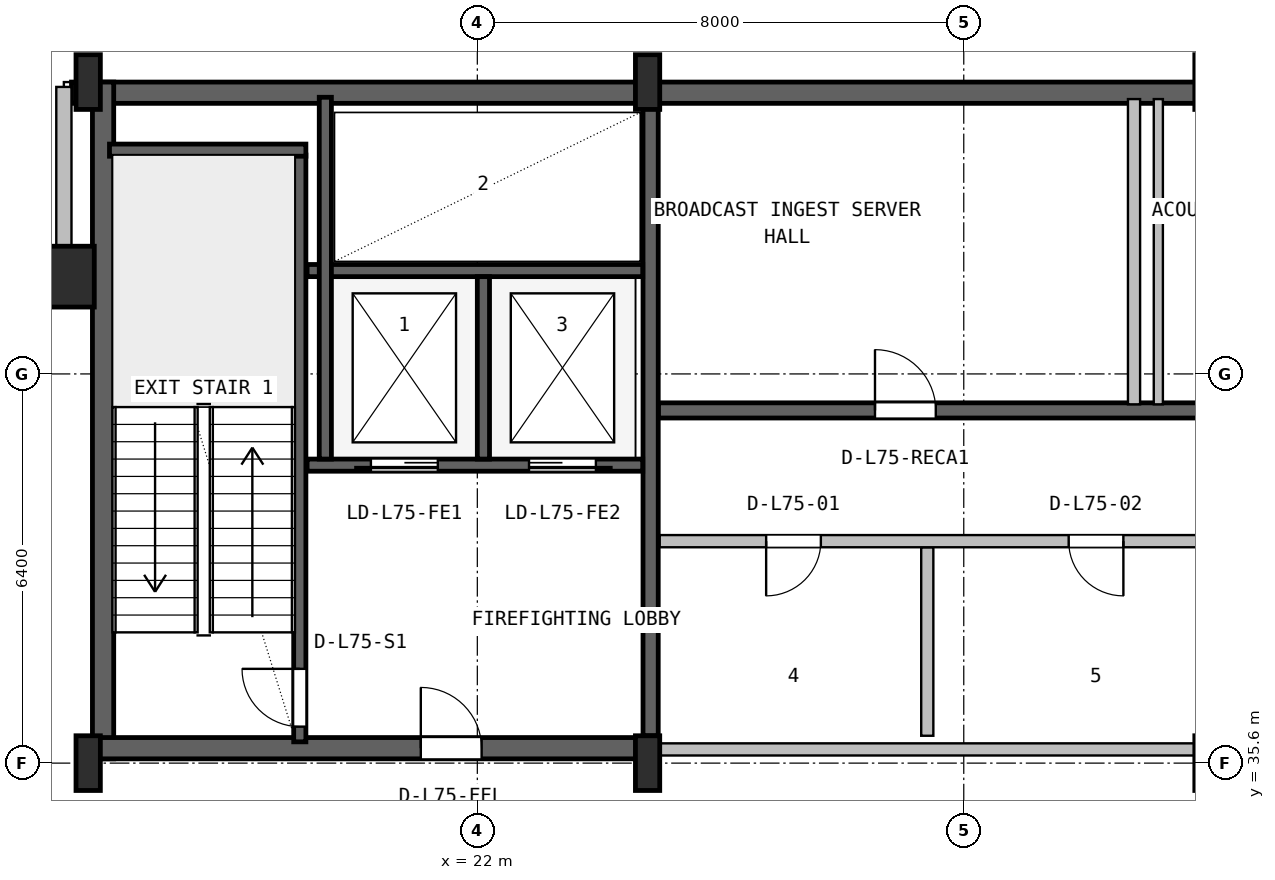
"""IFC4 building model, lengths in metres.
Left out: names, types, materials, properties, quantities, classifications, styles, units other than length and angle.
Written with IfcOpenShell. Run it as: python <this file> out.ifc"""

import sys

from ifc_helpers import new_model, si_unit, direction, frame, frame_2d, origin, origin_2d, place, context, subcontext, project, spatial, rectangle, hollow_rectangle, i_section, extrude, source, transform, mapped, element, fill, save


model = new_model("IFC4")
c1 = context("Model", 3, precision=1e-05, world=origin(), true_north=direction((0.0, 1.0)))
c2 = subcontext(c1, "Body", "Model", "MODEL_VIEW")
j1 = project(units=[si_unit("LENGTHUNIT", "METRE"), si_unit("PLANEANGLEUNIT", "RADIAN")], contexts=[c1])
p1 = place(None, origin())
s1 = spatial("IfcSite", under=j1, at=p1, CompositionType="ELEMENT")
p2 = place(p1, origin())
s2 = spatial("IfcBuilding", under=s1, at=p2, CompositionType="ELEMENT")
p3 = place(p2, frame((0.0, 0.0, 300.2)))
s3 = spatial("IfcBuildingStorey", under=s2, at=p3, CompositionType="ELEMENT", Elevation=300.2)
p4 = place(p3, frame((15.325, 46.625, 0.0), z_axis=(0.0, 0.0, 1.0), x_axis=(1.0, 0.0, 0.0)))
e1 = element("IfcWall", 1, at=p4, inside=s3, PredefinedType="SHEAR", context=c2, shape_type="SweptSolid", body=[
    extrude(rectangle(XDim=37.35, YDim=0.35, at=frame_2d((18.675, 0.0))), origin(), (0.0, 0.0, 1.0), 4.52),
])
p5 = place(p3, frame((15.845, 35.67, 0.0), z_axis=(0.0, 0.0, 1.0), x_axis=(0.0, 1.0, 0.0)))
e2 = element("IfcWall", 2, at=p5, inside=s3, PredefinedType="SHEAR", context=c2, shape_type="SweptSolid", body=[
    extrude(rectangle(XDim=11.13, YDim=0.35, at=frame_2d((5.565, 0.0))), origin(), (0.0, 0.0, 1.0), 4.52),
])
p6 = place(p3, frame((15.67, 35.845, 0.0), z_axis=(0.0, 0.0, 1.0), x_axis=(1.0, 0.0, 0.0)))
e3 = element("IfcWall", 3, at=p6, inside=s3, PredefinedType="SHEAR", context=c2, shape_type="SweptSolid", body=[
    extrude(rectangle(XDim=9.13, YDim=0.35, at=frame_2d((4.565, 0.0))), origin(), (0.0, 0.0, 1.0), 4.52),
])
p7 = place(p6, frame((5.4, 0.0, 0.0)))
e4 = element("IfcOpeningElement", 4, at=p7, cuts=e3, PredefinedType="OPENING", context=c2, shape_type="SweptSolid", body=[
    extrude(rectangle(XDim=1.0, YDim=2.1, at=frame_2d((0.5, 1.05))), frame((0.0, 0.185, 0.0), z_axis=(0.0, -1.0, 0.0), x_axis=(1.0, 0.0, 0.0)), (0.0, 0.0, 1.0), 0.37),
])
m1 = source(origin(), c2, "Body", "SweptSolid", [
    extrude(i_section(OverallWidth=0.4, OverallDepth=0.9, WebThickness=0.016, FlangeThickness=0.028, FilletRadius=0.016, at=origin_2d()), origin(), (0.0, 0.0, 1.0), 4.8),
])
for number, where, z_axis, x_axis in (
    (5, (15.6, 35.6, 0.0), (0.0, 0.0, 1.0), (1.0, 0.0, 0.0)),
    (6, (15.6, 46.8, 0.0), (0.0, 0.0, 1.0), (1.0, 0.0, 0.0)),
    (7, (24.8, 35.6, 0.0), (0.0, 0.0, 1.0), (1.0, 0.0, 0.0)),
    (8, (24.8, 46.8, 0.0), (0.0, 0.0, 1.0), (1.0, 0.0, 0.0)),
):
    element("IfcColumn", number, at=place(p3, frame(where, z_axis=z_axis, x_axis=x_axis)), inside=s3, PredefinedType="COLUMN", context=c2, shape_type="MappedRepresentation", body=[
        mapped(m1, transform((0.0, 0.0, 0.0), x_axis=(1.0, 0.0, 0.0), y_axis=(0.0, 1.0, 0.0), z_axis=(0.0, 0.0, 1.0), scale=1.0)),
    ])
m2 = source(origin(), c2, "Body", "SweptSolid", [
    extrude(hollow_rectangle(XDim=1.0, YDim=1.0, WallThickness=0.04, at=origin_2d()), origin(), (0.0, 0.0, 1.0), 4.8),
])
p8 = place(p3, frame((15.2, 43.6, 0.0), z_axis=(0.0, 0.0, 1.0), x_axis=(1.0, 0.0, 0.0)))
e9 = element("IfcColumn", 9, at=p8, inside=s3, PredefinedType="COLUMN", context=c2, shape_type="MappedRepresentation", body=[
    mapped(m2, transform((0.0, 0.0, 0.0), x_axis=(1.0, 0.0, 0.0), y_axis=(0.0, 1.0, 0.0), z_axis=(0.0, 0.0, 1.0), scale=1.0)),
])
p9 = place(p3, frame((12.08, 43.6, 0.0), z_axis=(0.0, 0.0, 1.0), x_axis=(1.0, 0.0, 0.0)))
e10 = element("IfcWall", 10, at=p9, inside=s3, PredefinedType="SOLIDWALL", context=c2, shape_type="SweptSolid", body=[
    extrude(rectangle(XDim=2.99, YDim=0.25, at=frame_2d((1.495, 0.0))), origin(), (0.0, 0.0, 1.0), 4.5),
])
p10 = place(p3, frame((15.2, 43.52, 0.0), z_axis=(0.0, 0.0, 1.0), x_axis=(0.0, 1.0, 0.0)))
e11 = element("IfcWall", 11, at=p10, inside=s3, PredefinedType="SOLIDWALL", context=c2, shape_type="SweptSolid", body=[
    extrude(rectangle(XDim=3.2, YDim=0.25, at=frame_2d((1.6, 0.0))), origin(), (0.0, 0.0, 1.0), 4.141),
])
p11 = place(p3, frame((19.08, 35.95, 0.0), z_axis=(0.0, 0.0, 1.0), x_axis=(0.0, 1.0, 0.0)))
e12 = element("IfcWall", 12, at=p11, inside=s3, PredefinedType="SHEAR", context=c2, shape_type="SweptSolid", body=[
    extrude(rectangle(XDim=9.65, YDim=0.2, at=frame_2d((4.825, 0.0))), origin(), (0.0, 0.0, 1.0), 4.52),
])
p12 = place(p11, frame((0.25, 0.0, 0.0)))
e13 = element("IfcOpeningElement", 13, at=p12, cuts=e12, PredefinedType="OPENING", context=c2, shape_type="SweptSolid", body=[
    extrude(rectangle(XDim=0.95, YDim=2.1, at=frame_2d((0.475, 1.05))), frame((0.0, 0.11, 0.0), z_axis=(0.0, -1.0, 0.0), x_axis=(1.0, 0.0, 0.0)), (0.0, 0.0, 1.0), 0.22),
])
p13 = place(p3, frame((15.95, 45.68, 0.0), z_axis=(0.0, 0.0, 1.0), x_axis=(1.0, 0.0, 0.0)))
e14 = element("IfcWall", 14, at=p13, inside=s3, PredefinedType="SHEAR", context=c2, shape_type="SweptSolid", body=[
    extrude(rectangle(XDim=3.23, YDim=0.2, at=frame_2d((1.615, 0.0))), origin(), (0.0, 0.0, 1.0), 4.52),
])
p14 = place(p3, frame((24.85, 36.05, 0.0), z_axis=(0.0, 0.0, 1.0), x_axis=(0.0, 1.0, 0.0)))
e15 = element("IfcWall", 15, at=p14, inside=s3, PredefinedType="SHEAR", context=c2, shape_type="SweptSolid", body=[
    extrude(rectangle(XDim=10.45, YDim=0.25, at=frame_2d((5.225, 0.0))), origin(), (0.0, 0.0, 1.0), 4.52),
])
p15 = place(p3, frame((19.2, 40.5, 0.0), z_axis=(0.0, 0.0, 1.0), x_axis=(1.0, 0.0, 0.0)))
e16 = element("IfcWall", 16, at=p15, inside=s3, PredefinedType="SHEAR", context=c2, shape_type="SweptSolid", body=[
    extrude(rectangle(XDim=5.52, YDim=0.2, at=frame_2d((2.76, 0.0))), origin(), (0.0, 0.0, 1.0), 4.52),
])
p16 = place(p15, frame((1.05, 0.0, 0.0)))
e17 = element("IfcOpeningElement", 17, at=p16, cuts=e16, PredefinedType="OPENING", context=c2, shape_type="SweptSolid", body=[
    extrude(rectangle(XDim=1.1, YDim=2.18, at=frame_2d((0.55, 1.09))), frame((0.0, 0.11, 0.0), z_axis=(0.0, -1.0, 0.0), x_axis=(1.0, 0.0, 0.0)), (0.0, 0.0, 1.0), 0.22),
])
p17 = place(p15, frame((3.65, 0.0, 0.0)))
e18 = element("IfcOpeningElement", 18, at=p17, cuts=e16, PredefinedType="OPENING", context=c2, shape_type="SweptSolid", body=[
    extrude(rectangle(XDim=1.1, YDim=2.18, at=frame_2d((0.55, 1.09))), frame((0.0, 0.11, 0.0), z_axis=(0.0, -1.0, 0.0), x_axis=(1.0, 0.0, 0.0)), (0.0, 0.0, 1.0), 0.22),
])
p18 = place(p3, frame((19.2, 43.7, 0.0), z_axis=(0.0, 0.0, 1.0), x_axis=(1.0, 0.0, 0.0)))
e19 = element("IfcWall", 19, at=p18, inside=s3, PredefinedType="SHEAR", context=c2, shape_type="SweptSolid", body=[
    extrude(rectangle(XDim=5.52, YDim=0.2, at=frame_2d((2.76, 0.0))), origin(), (0.0, 0.0, 1.0), 4.52),
])
p19 = place(p3, frame((22.1, 40.6, 0.0), z_axis=(0.0, 0.0, 1.0), x_axis=(0.0, 1.0, 0.0)))
e20 = element("IfcWall", 20, at=p19, inside=s3, PredefinedType="SHEAR", context=c2, shape_type="SweptSolid", body=[
    extrude(rectangle(XDim=3.0, YDim=0.2, at=frame_2d((1.5, 0.0))), origin(), (0.0, 0.0, 1.0), 4.52),
])
p20 = place(p3, frame((19.5, 40.6, 0.0), z_axis=(0.0, 0.0, 1.0), x_axis=(0.0, 1.0, 0.0)))
e21 = element("IfcWall", 21, at=p20, inside=s3, PredefinedType="SHEAR", context=c2, shape_type="SweptSolid", body=[
    extrude(rectangle(XDim=5.95, YDim=0.2, at=frame_2d((2.975, 0.0))), origin(), (0.0, 0.0, 1.0), 4.52),
])
p21 = place(p3, frame((24.98, 41.4, 0.0), z_axis=(0.0, 0.0, 1.0), x_axis=(1.0, 0.0, 0.0)))
e22 = element("IfcWall", 22, at=p21, inside=s3, PredefinedType="SHEAR", context=c2, shape_type="SweptSolid", body=[
    extrude(rectangle(XDim=23.82, YDim=0.25, at=frame_2d((11.91, 0.0))), origin(), (0.0, 0.0, 1.0), 4.52),
])
p22 = place(p21, frame((3.56, 0.0, 0.0)))
e23 = element("IfcOpeningElement", 23, at=p22, cuts=e22, PredefinedType="OPENING", context=c2, shape_type="SweptSolid", body=[
    extrude(rectangle(XDim=1.0, YDim=2.08, at=frame_2d((0.5, 1.04))), frame((0.0, 0.135, 0.0), z_axis=(0.0, -1.0, 0.0), x_axis=(1.0, 0.0, 0.0)), (0.0, 0.0, 1.0), 0.27),
])
p23 = place(p21, frame((9.76, 0.0, 0.0)))
e24 = element("IfcOpeningElement", 24, at=p23, cuts=e22, PredefinedType="OPENING", context=c2, shape_type="SweptSolid", body=[
    extrude(rectangle(XDim=0.92, YDim=2.08, at=frame_2d((0.46, 1.04))), frame((0.0, 0.135, 0.0), z_axis=(0.0, -1.0, 0.0), x_axis=(1.0, 0.0, 0.0)), (0.0, 0.0, 1.0), 0.27),
])
p24 = place(p21, frame((13.66, 0.0, 0.0)))
e25 = element("IfcOpeningElement", 25, at=p24, cuts=e22, PredefinedType="OPENING", context=c2, shape_type="SweptSolid", body=[
    extrude(rectangle(XDim=0.92, YDim=2.08, at=frame_2d((0.46, 1.04))), frame((0.0, 0.135, 0.0), z_axis=(0.0, -1.0, 0.0), x_axis=(1.0, 0.0, 0.0)), (0.0, 0.0, 1.0), 0.27),
])
p25 = place(p3, frame((25.0, 35.825, 0.0), z_axis=(0.0, 0.0, 1.0), x_axis=(1.0, 0.0, 0.0)))
e26 = element("IfcWall", 26, at=p25, inside=s3, PredefinedType="PLUMBINGWALL", context=c2, shape_type="SweptSolid", body=[
    extrude(rectangle(XDim=9.75, YDim=0.2, at=frame_2d((4.875, 0.0))), origin(), (0.0, 0.0, 1.0), 3.545),
])
p26 = place(p3, frame((29.4, 36.05, 0.0), z_axis=(0.0, 0.0, 1.0), x_axis=(0.0, 1.0, 0.0)))
e27 = element("IfcWall", 27, at=p26, inside=s3, PredefinedType="PLUMBINGWALL", context=c2, shape_type="SweptSolid", body=[
    extrude(rectangle(XDim=3.1, YDim=0.2, at=frame_2d((1.55, 0.0))), origin(), (0.0, 0.0, 1.0), 4.5),
])
p27 = place(p3, frame((25.0, 39.25, 0.0), z_axis=(0.0, 0.0, 1.0), x_axis=(1.0, 0.0, 0.0)))
e28 = element("IfcWall", 28, at=p27, inside=s3, PredefinedType="PLUMBINGWALL", context=c2, shape_type="SweptSolid", body=[
    extrude(rectangle(XDim=9.75, YDim=0.2, at=frame_2d((4.875, 0.0))), origin(), (0.0, 0.0, 1.0), 4.5),
])
p28 = place(p27, frame((1.75, 0.0, 0.0)))
e29 = element("IfcOpeningElement", 29, at=p28, cuts=e28, PredefinedType="OPENING", context=c2, shape_type="SweptSolid", body=[
    extrude(rectangle(XDim=0.9, YDim=2.06, at=frame_2d((0.45, 1.03))), frame((0.0, 0.11, 0.0), z_axis=(0.0, -1.0, 0.0), x_axis=(1.0, 0.0, 0.0)), (0.0, 0.0, 1.0), 0.22),
])
p29 = place(p27, frame((6.725, 0.0, 0.0)))
e30 = element("IfcOpeningElement", 30, at=p29, cuts=e28, PredefinedType="OPENING", context=c2, shape_type="SweptSolid", body=[
    extrude(rectangle(XDim=0.9, YDim=2.06, at=frame_2d((0.45, 1.03))), frame((0.0, 0.11, 0.0), z_axis=(0.0, -1.0, 0.0), x_axis=(1.0, 0.0, 0.0)), (0.0, 0.0, 1.0), 0.22),
])
p30 = place(p3, frame((32.8, 41.5, 0.0), z_axis=(0.0, 0.0, 1.0), x_axis=(0.0, 1.0, 0.0)))
e31 = element("IfcWall", 31, at=p30, inside=s3, PredefinedType="SOLIDWALL", context=c2, shape_type="SweptSolid", body=[
    extrude(rectangle(XDim=5.02, YDim=0.2, at=frame_2d((2.51, 0.0))), origin(), (0.0, 0.0, 1.0), 4.5),
])
p31 = place(p3, frame((33.2, 41.5, 0.0), z_axis=(0.0, 0.0, 1.0), x_axis=(0.0, 1.0, 0.0)))
e32 = element("IfcWall", 32, at=p31, inside=s3, PredefinedType="PARTITIONING", context=c2, shape_type="SweptSolid", body=[
    extrude(rectangle(XDim=5.02, YDim=0.15, at=frame_2d((2.51, 0.0))), origin(), (0.0, 0.0, 1.0), 4.5),
])
m3 = source(origin(), c2, "Body", "SweptSolid", [
    extrude(rectangle(XDim=0.95, YDim=2.1, at=frame_2d((0.475, 1.05))), frame((0.0, 0.025, 0.0), z_axis=(0.0, -1.0, 0.0), x_axis=(1.0, 0.0, 0.0)), (0.0, 0.0, 1.0), 0.05),
])
p32 = place(p12, origin())
e33 = element("IfcDoor", 33, at=p32, inside=s3, OperationType="SINGLE_SWING_RIGHT", PredefinedType="DOOR", context=c2, shape_type="MappedRepresentation", body=[
    mapped(m3, transform((0.0, 0.0, 0.0), x_axis=(1.0, 0.0, 0.0), y_axis=(0.0, 1.0, 0.0), z_axis=(0.0, 0.0, 1.0), scale=1.0)),
])
fill(e13, e33)
m4 = source(origin(), c2, "Body", "SweptSolid", [
    extrude(rectangle(XDim=1.0, YDim=2.1, at=frame_2d((0.5, 1.05))), frame((0.0, 0.025, 0.0), z_axis=(0.0, -1.0, 0.0), x_axis=(1.0, 0.0, 0.0)), (0.0, 0.0, 1.0), 0.05),
])
p33 = place(p7, origin())
e34 = element("IfcDoor", 34, at=p33, inside=s3, OperationType="SINGLE_SWING_LEFT", PredefinedType="DOOR", context=c2, shape_type="MappedRepresentation", body=[
    mapped(m4, transform((0.0, 0.0, 0.0), x_axis=(1.0, 0.0, 0.0), y_axis=(0.0, 1.0, 0.0), z_axis=(0.0, 0.0, 1.0), scale=1.0)),
])
fill(e4, e34)
m5 = source(origin(), c2, "Body", "SweptSolid", [
    extrude(rectangle(XDim=1.1, YDim=2.18, at=frame_2d((0.55, 1.09))), frame((0.0, 0.025, 0.0), z_axis=(0.0, -1.0, 0.0), x_axis=(1.0, 0.0, 0.0)), (0.0, 0.0, 1.0), 0.05),
])
p34 = place(p16, frame((1.1, 0.0, 0.0), z_axis=(0.0, 0.0, 1.0), x_axis=(-1.0, 0.0, 0.0)))
e35 = element("IfcDoor", 35, at=p34, inside=s3, OperationType="SLIDING_TO_LEFT", PredefinedType="DOOR", context=c2, shape_type="MappedRepresentation", body=[
    mapped(m5, transform((0.0, 0.0, 0.0), x_axis=(1.0, 0.0, 0.0), y_axis=(0.0, 1.0, 0.0), z_axis=(0.0, 0.0, 1.0), scale=1.0)),
])
fill(e17, e35)
p35 = place(p17, frame((1.1, 0.0, 0.0), z_axis=(0.0, 0.0, 1.0), x_axis=(-1.0, 0.0, 0.0)))
e36 = element("IfcDoor", 36, at=p35, inside=s3, OperationType="SLIDING_TO_RIGHT", PredefinedType="DOOR", context=c2, shape_type="MappedRepresentation", body=[
    mapped(m5, transform((0.0, 0.0, 0.0), x_axis=(1.0, 0.0, 0.0), y_axis=(0.0, 1.0, 0.0), z_axis=(0.0, 0.0, 1.0), scale=1.0)),
])
fill(e18, e36)
m6 = source(origin(), c2, "Body", "SweptSolid", [
    extrude(rectangle(XDim=1.0, YDim=2.08, at=frame_2d((0.5, 1.04))), frame((0.0, 0.025, 0.0), z_axis=(0.0, -1.0, 0.0), x_axis=(1.0, 0.0, 0.0)), (0.0, 0.0, 1.0), 0.05),
])
p36 = place(p22, origin())
e37 = element("IfcDoor", 37, at=p36, inside=s3, OperationType="SINGLE_SWING_LEFT", PredefinedType="DOOR", context=c2, shape_type="MappedRepresentation", body=[
    mapped(m6, transform((0.0, 0.0, 0.0), x_axis=(1.0, 0.0, 0.0), y_axis=(0.0, 1.0, 0.0), z_axis=(0.0, 0.0, 1.0), scale=1.0)),
])
fill(e23, e37)
m7 = source(origin(), c2, "Body", "SweptSolid", [
    extrude(rectangle(XDim=0.9, YDim=2.06, at=frame_2d((0.45, 1.03))), frame((0.0, 0.025, 0.0), z_axis=(0.0, -1.0, 0.0), x_axis=(1.0, 0.0, 0.0)), (0.0, 0.0, 1.0), 0.05),
])
p37 = place(p28, frame((0.9, 0.0, 0.0), z_axis=(0.0, 0.0, 1.0), x_axis=(-1.0, 0.0, 0.0)))
e38 = element("IfcDoor", 38, at=p37, inside=s3, OperationType="SINGLE_SWING_LEFT", PredefinedType="DOOR", context=c2, shape_type="MappedRepresentation", body=[
    mapped(m7, transform((0.0, 0.0, 0.0), x_axis=(1.0, 0.0, 0.0), y_axis=(0.0, 1.0, 0.0), z_axis=(0.0, 0.0, 1.0), scale=1.0)),
])
fill(e29, e38)
p38 = place(p29, frame((0.9, 0.0, 0.0), z_axis=(0.0, 0.0, 1.0), x_axis=(-1.0, 0.0, 0.0)))
e39 = element("IfcDoor", 39, at=p38, inside=s3, OperationType="SINGLE_SWING_RIGHT", PredefinedType="DOOR", context=c2, shape_type="MappedRepresentation", body=[
    mapped(m7, transform((0.0, 0.0, 0.0), x_axis=(1.0, 0.0, 0.0), y_axis=(0.0, 1.0, 0.0), z_axis=(0.0, 0.0, 1.0), scale=1.0)),
])
fill(e30, e39)
save(model, sys.argv[1])
